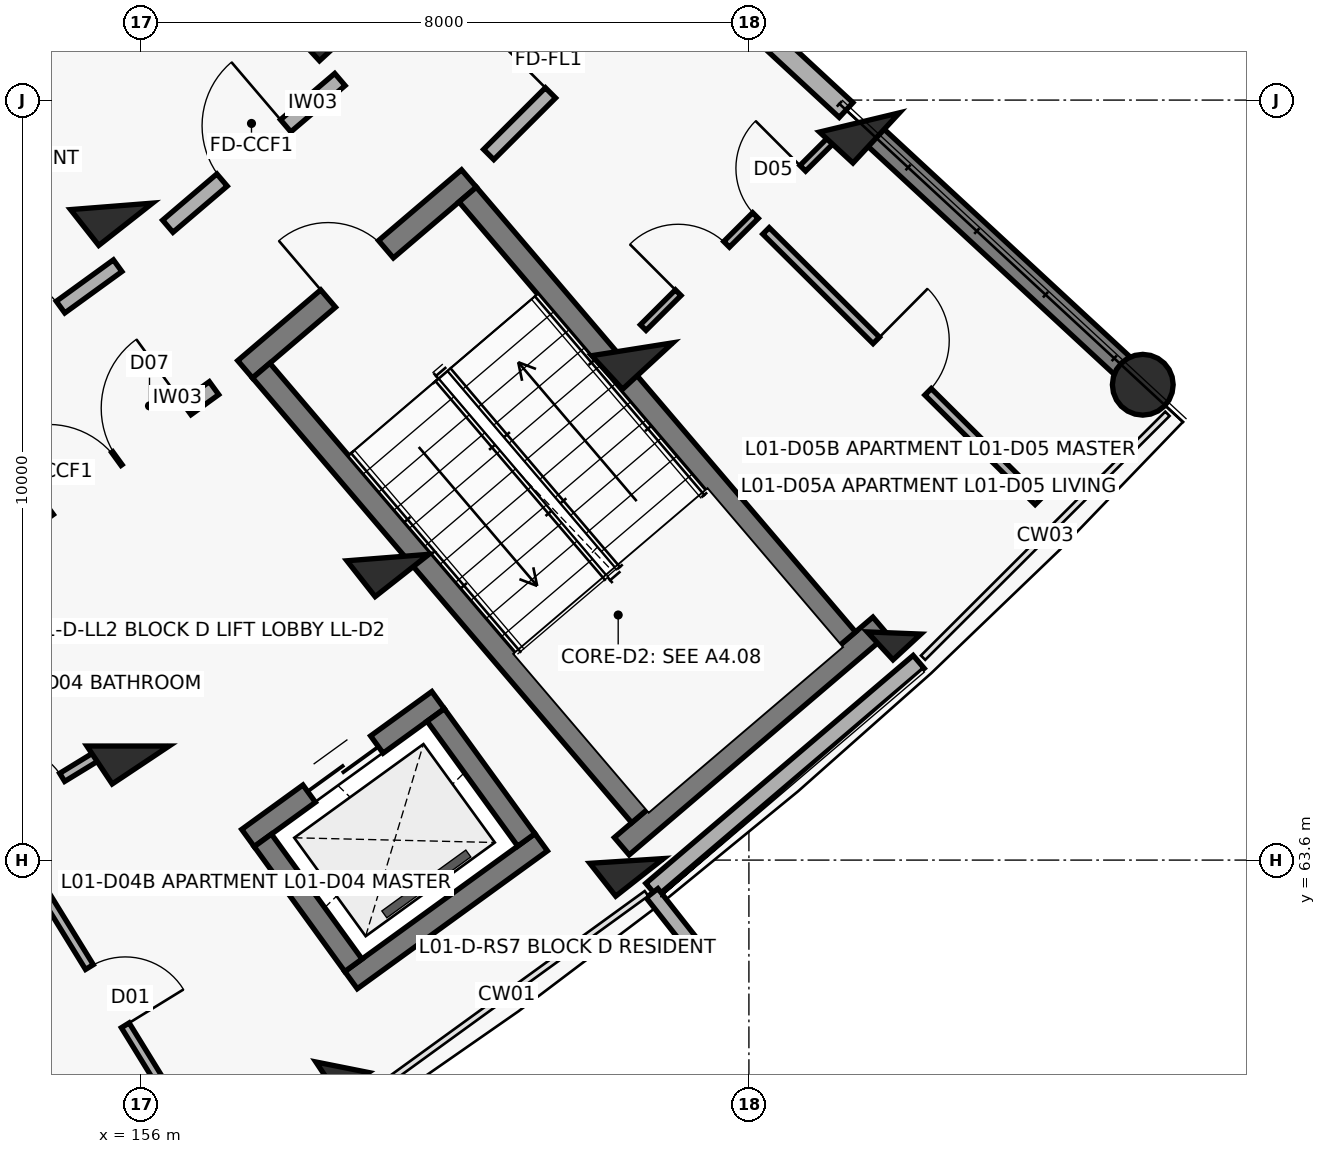
"""IFC4 building model, lengths in metres.
Left out: names, types, materials, properties, quantities, classifications, styles, units other than length and angle.
Written with IfcOpenShell. Run it as: python <this file> out.ifc"""

import sys

from ifc_helpers import new_model, si_unit, direction, frame, frame_2d, origin, origin_2d, place, context, subcontext, project, spatial, rectangle, circle, extrude, element, fill, save


model = new_model("IFC4")
c1 = context("Model", 3, precision=1e-05, world=origin(), true_north=direction((0.0, 1.0)))
c2 = subcontext(c1, "Body", "Model", "MODEL_VIEW")
j1 = project(units=[si_unit("LENGTHUNIT", "METRE"), si_unit("PLANEANGLEUNIT", "RADIAN")], contexts=[c1])
p1 = place(None, origin())
s1 = spatial("IfcSite", under=j1, at=p1, CompositionType="ELEMENT")
p2 = place(p1, origin())
s2 = spatial("IfcBuilding", under=s1, at=p2, CompositionType="ELEMENT")
p3 = place(p2, frame((0.0, 0.0, 4.5)))
s3 = spatial("IfcBuildingStorey", under=s2, at=p3, CompositionType="ELEMENT", Elevation=4.5)
p4 = place(p3, frame((155.831, 65.101, 0.0), z_axis=(0.0, 0.0, 1.0), x_axis=(0.554844427448, -0.83195412213, 0.0)))
e1 = element("IfcColumn", 1, at=p4, inside=s3, PredefinedType="COLUMN", context=c2, shape_type="SweptSolid", body=[
    extrude(rectangle(XDim=0.6, YDim=0.9, at=origin_2d()), origin(), (0.0, 0.0, 1.0), 3.6),
])
p5 = place(p3, frame((158.649, 60.875, 0.0), z_axis=(0.0, 0.0, 1.0), x_axis=(0.554844427448, -0.83195412213, 0.0)))
e2 = element("IfcColumn", 2, at=p5, inside=s3, PredefinedType="COLUMN", context=c2, shape_type="SweptSolid", body=[
    extrude(rectangle(XDim=0.5, YDim=0.5, at=origin_2d()), origin(), (0.0, 0.0, 1.0), 3.6),
])
for number, where, z_axis, x_axis in (
    (3, (155.614, 72.202, 0.0), (0.0, 0.0, 1.0), (0.618, -0.786, 0.0)),
    (4, (159.25, 67.581, 0.0), (0.0, 0.0, 1.0), (0.618, -0.786, 0.0)),
):
    element("IfcColumn", number, at=place(p3, frame(where, z_axis=z_axis, x_axis=x_axis)), inside=s3, PredefinedType="COLUMN", context=c2, shape_type="SweptSolid", body=[
        extrude(rectangle(XDim=0.6, YDim=0.9, at=origin_2d()), origin(), (0.0, 0.0, 1.0), 3.6),
    ])
p6 = place(p3, frame((162.392, 63.589, 0.0), z_axis=(0.0, 0.0, 1.0), x_axis=(0.618408395358, -0.785856893175, 0.0)))
e5 = element("IfcColumn", 5, at=p6, inside=s3, PredefinedType="COLUMN", context=c2, shape_type="SweptSolid", body=[
    extrude(rectangle(XDim=0.55, YDim=0.8, at=origin_2d()), origin(), (0.0, 0.0, 1.0), 3.6),
])
for number, where, z_axis, x_axis in (
    (6, (158.477, 74.643, 0.0), (0.0, 0.0, 1.0), (0.678, -0.735, 0.0)),
    (7, (162.465, 70.322, 0.0), (0.0, 0.0, 1.0), (0.678, -0.735, 0.0)),
):
    element("IfcColumn", number, at=place(p3, frame(where, z_axis=z_axis, x_axis=x_axis)), inside=s3, PredefinedType="COLUMN", context=c2, shape_type="SweptSolid", body=[
        extrude(rectangle(XDim=0.6, YDim=0.9, at=origin_2d()), origin(), (0.0, 0.0, 1.0), 3.6),
    ])
p7 = place(p3, frame((165.91, 66.588, 0.0), z_axis=(0.0, 0.0, 1.0), x_axis=(0.678159669868, -0.73491459515, 0.0)))
e8 = element("IfcColumn", 8, at=p7, inside=s3, PredefinedType="COLUMN", context=c2, shape_type="SweptSolid", body=[
    extrude(rectangle(XDim=0.5, YDim=0.5, at=origin_2d()), origin(), (0.0, 0.0, 1.0), 3.6),
])
p8 = place(p3, frame((165.455, 73.306, 0.0), z_axis=(0.0, 0.0, 1.0), x_axis=(0.733729864503, -0.679441304262, 0.0)))
e9 = element("IfcColumn", 9, at=p8, inside=s3, PredefinedType="COLUMN", context=c2, shape_type="SweptSolid", body=[
    extrude(rectangle(XDim=0.6, YDim=0.9, at=origin_2d()), origin(), (0.0, 0.0, 1.0), 3.6),
])
p9 = place(p3, frame((169.182, 69.854, 0.0), z_axis=(0.0, 0.0, 1.0), x_axis=(0.733729864503, -0.679441304262, 0.0)))
e10 = element("IfcColumn", 10, at=p9, inside=s3, PredefinedType="COLUMN", context=c2, shape_type="SweptSolid", body=[
    extrude(circle(Radius=0.4, at=origin_2d()), origin(), (0.0, 0.0, 1.0), 3.6),
])
p10 = place(p3, frame((165.587, 73.184, 0.0), z_axis=(0.0, 0.0, 1.0), x_axis=(0.733739663667, -0.679430721974, 0.0)))
e11 = element("IfcWall", 11, at=p10, inside=s3, PredefinedType="SHEAR", context=c2, shape_type="SweptSolid", body=[
    extrude(rectangle(XDim=4.72, YDim=0.31, at=frame_2d((2.36, 0.0))), origin(), (0.0, 0.0, 1.0), 3.36),
])
p11 = place(p3, frame((162.716, 63.209, 0.0), z_axis=(0.0, 0.0, 1.0), x_axis=(0.760968923704, 0.64878833001, 0.0)))
e12 = element("IfcWall", 12, at=p11, inside=s3, PredefinedType="SOLIDWALL", context=c2, shape_type="SweptSolid", body=[
    extrude(rectangle(XDim=4.623, YDim=0.224, at=frame_2d((2.311, 0.0))), origin(), (0.0, 0.0, 1.0), 2.6),
])
p12 = place(p3, frame((162.726, 63.164, 0.0), z_axis=(0.0, 0.0, 1.0), x_axis=(0.618456270212, -0.785819217019, 0.0)))
e13 = element("IfcWall", 13, at=p12, inside=s3, PredefinedType="PARAPET", context=c2, shape_type="SweptSolid", body=[
    extrude(rectangle(XDim=0.9, YDim=0.195, at=frame_2d((0.45, 0.0))), origin(), (0.0, 0.0, 1.0), 2.6),
])
p13 = place(p3, frame((159.262, 79.041, 0.0), z_axis=(0.0, 0.0, 1.0), x_axis=(0.733738684326, -0.679431779595, 0.0)))
e14 = element("IfcWall", 14, at=p13, inside=s3, PredefinedType="SOLIDWALL", context=c2, shape_type="SweptSolid", body=[
    extrude(rectangle(XDim=8.2, YDim=0.265, at=frame_2d((4.1, 0.0))), origin(), (0.0, 0.0, 1.0), 2.58),
])
p14 = place(p13, frame((3.59, 0.0, 0.75)))
e15 = element("IfcOpeningElement", 15, at=p14, cuts=e14, PredefinedType="OPENING", context=c2, shape_type="SweptSolid", body=[
    extrude(rectangle(XDim=1.35, YDim=1.35, at=frame_2d((0.675, 0.675))), frame((0.0, 0.142, 0.0), z_axis=(0.0, -1.0, 0.0), x_axis=(1.0, 0.0, 0.0)), (0.0, 0.0, 1.0), 0.285),
])
p15 = place(p3, frame((157.372, 70.058, 0.0), z_axis=(0.0, 0.0, 1.0), x_axis=(0.760990583254, 0.648762924495, 0.0)))
e16 = element("IfcWall", 16, at=p15, inside=s3, PredefinedType="SHEAR", context=c2, shape_type="SweptSolid", body=[
    extrude(rectangle(XDim=3.87, YDim=0.3, at=frame_2d((1.935, 0.0))), origin(), (0.0, 0.0, 1.0), 3.6),
])
p16 = place(p15, frame((1.435, 0.0, 0.0)))
e17 = element("IfcOpeningElement", 17, at=p16, cuts=e16, PredefinedType="OPENING", context=c2, shape_type="SweptSolid", body=[
    extrude(rectangle(XDim=1.0, YDim=2.15, at=frame_2d((0.5, 1.075))), frame((0.0, 0.16, 0.0), z_axis=(0.0, -1.0, 0.0), x_axis=(1.0, 0.0, 0.0)), (0.0, 0.0, 1.0), 0.32),
])
p17 = place(p3, frame((162.327, 63.783, 0.0), z_axis=(0.0, 0.0, 1.0), x_axis=(0.760969560012, 0.648787583678, 0.0)))
e18 = element("IfcWall", 18, at=p17, inside=s3, PredefinedType="SHEAR", context=c2, shape_type="SweptSolid", body=[
    extrude(rectangle(XDim=4.47, YDim=0.3, at=frame_2d((2.235, 0.0))), origin(), (0.0, 0.0, 1.0), 3.6),
])
p18 = place(p3, frame((157.583, 70.041, 0.0), z_axis=(0.0, 0.0, 1.0), x_axis=(0.648762810187, -0.760990680704, 0.0)))
e19 = element("IfcWall", 19, at=p18, inside=s3, PredefinedType="SHEAR", context=c2, shape_type="SweptSolid", body=[
    extrude(rectangle(XDim=7.69, YDim=0.3, at=frame_2d((3.845, 0.0))), origin(), (0.0, 0.0, 1.0), 3.6),
])
p19 = place(p3, frame((160.3, 72.357, 0.0), z_axis=(0.0, 0.0, 1.0), x_axis=(0.648781194888, -0.760975006922, 0.0)))
e20 = element("IfcWall", 20, at=p19, inside=s3, PredefinedType="SHEAR", context=c2, shape_type="SweptSolid", body=[
    extrude(rectangle(XDim=7.69, YDim=0.3, at=frame_2d((3.845, 0.0))), origin(), (0.0, 0.0, 1.0), 3.6),
])
p20 = place(p3, frame((157.409, 63.89, 0.0), z_axis=(0.0, 0.0, 1.0), x_axis=(0.809510936031, 0.587104798521, 0.0)))
e21 = element("IfcWall", 21, at=p20, inside=s3, PredefinedType="SHEAR", context=c2, shape_type="SweptSolid", body=[
    extrude(rectangle(XDim=3.09, YDim=0.28, at=frame_2d((1.545, 0.0))), origin(), (0.0, 0.0, 1.0), 3.6),
])
p21 = place(p20, frame((0.995, 0.0, 0.0)))
e22 = element("IfcOpeningElement", 22, at=p21, cuts=e21, PredefinedType="OPENING", context=c2, shape_type="SweptSolid", body=[
    extrude(rectangle(XDim=1.1, YDim=2.15, at=frame_2d((0.55, 1.075))), frame((0.0, 0.15, 0.0), z_axis=(0.0, -1.0, 0.0), x_axis=(1.0, 0.0, 0.0)), (0.0, 0.0, 1.0), 0.3),
])
p22 = place(p3, frame((158.765, 62.021, 0.0), z_axis=(0.0, 0.0, 1.0), x_axis=(0.809548485838, 0.587053020669, 0.0)))
e23 = element("IfcWall", 23, at=p22, inside=s3, PredefinedType="SHEAR", context=c2, shape_type="SweptSolid", body=[
    extrude(rectangle(XDim=3.09, YDim=0.28, at=frame_2d((1.545, 0.0))), origin(), (0.0, 0.0, 1.0), 3.6),
])
p23 = place(p3, frame((157.604, 63.859, 0.0), z_axis=(0.0, 0.0, 1.0), x_axis=(0.587127188998, -0.809494696671, 0.0)))
e24 = element("IfcWall", 24, at=p23, inside=s3, PredefinedType="SHEAR", context=c2, shape_type="SweptSolid", body=[
    extrude(rectangle(XDim=2.03, YDim=0.28, at=frame_2d((1.015, 0.0))), origin(), (0.0, 0.0, 1.0), 3.6),
])
p24 = place(p3, frame((159.879, 65.509, 0.0), z_axis=(0.0, 0.0, 1.0), x_axis=(0.58704837408, -0.809551855344, 0.0)))
e25 = element("IfcWall", 25, at=p24, inside=s3, PredefinedType="SHEAR", context=c2, shape_type="SweptSolid", body=[
    extrude(rectangle(XDim=2.03, YDim=0.28, at=frame_2d((1.015, 0.0))), origin(), (0.0, 0.0, 1.0), 3.6),
])
p25 = place(p3, frame((152.434, 63.141, 0.0), z_axis=(0.0, 0.0, 1.0), x_axis=(0.853089873067, 0.521763996909, 0.0)))
e26 = element("IfcWall", 26, at=p25, inside=s3, PredefinedType="PARTITIONING", context=c2, shape_type="SweptSolid", body=[
    extrude(rectangle(XDim=3.616, YDim=0.125, at=frame_2d((1.808, 0.0))), origin(), (0.0, 0.0, 1.0), 2.58),
])
p26 = place(p25, frame((0.65, 0.0, 0.0)))
e27 = element("IfcOpeningElement", 27, at=p26, cuts=e26, PredefinedType="OPENING", context=c2, shape_type="SweptSolid", body=[
    extrude(rectangle(XDim=0.9, YDim=2.1, at=frame_2d((0.45, 1.05))), frame((0.0, 0.073, 0.0), z_axis=(0.0, -1.0, 0.0), x_axis=(1.0, 0.0, 0.0)), (0.0, 0.0, 1.0), 0.145),
])
p27 = place(p25, frame((2.086, 0.0, 0.0)))
e28 = element("IfcOpeningElement", 28, at=p27, cuts=e26, PredefinedType="OPENING", context=c2, shape_type="SweptSolid", body=[
    extrude(rectangle(XDim=0.88, YDim=2.1, at=frame_2d((0.44, 1.05))), frame((0.0, 0.073, 0.0), z_axis=(0.0, -1.0, 0.0), x_axis=(1.0, 0.0, 0.0)), (0.0, 0.0, 1.0), 0.145),
])
p28 = place(p3, frame((154.235, 63.96, 0.0), z_axis=(0.0, 0.0, 1.0), x_axis=(0.524202618281, -0.851593573829, 0.0)))
e29 = element("IfcWall", 29, at=p28, inside=s3, PredefinedType="PARTITIONING", context=c2, shape_type="SweptSolid", body=[
    extrude(rectangle(XDim=5.05, YDim=0.12, at=frame_2d((2.525, 0.0))), origin(), (0.0, 0.0, 1.0), 2.58),
])
p29 = place(p28, frame((2.075, 0.0, 0.0)))
e30 = element("IfcOpeningElement", 30, at=p29, cuts=e29, PredefinedType="OPENING", context=c2, shape_type="SweptSolid", body=[
    extrude(rectangle(XDim=0.9, YDim=2.1, at=frame_2d((0.45, 1.05))), frame((0.0, 0.07, 0.0), z_axis=(0.0, -1.0, 0.0), x_axis=(1.0, 0.0, 0.0)), (0.0, 0.0, 1.0), 0.14),
])
p30 = place(p3, frame((154.423, 67.968, 0.0), z_axis=(0.0, 0.0, 1.0), x_axis=(0.809516127005, 0.587097641043, 0.0)))
e31 = element("IfcWall", 31, at=p30, inside=s3, PredefinedType="SOLIDWALL", context=c2, shape_type="SweptSolid", body=[
    extrude(rectangle(XDim=3.137, YDim=0.21, at=frame_2d((1.569, 0.0))), origin(), (0.0, 0.0, 1.0), 2.58),
])
p31 = place(p30, frame((0.45, 0.0, 0.0)))
e32 = element("IfcOpeningElement", 32, at=p31, cuts=e31, PredefinedType="OPENING", context=c2, shape_type="SweptSolid", body=[
    extrude(rectangle(XDim=1.1, YDim=2.15, at=frame_2d((0.55, 1.075))), frame((0.0, 0.115, 0.0), z_axis=(0.0, -1.0, 0.0), x_axis=(1.0, 0.0, 0.0)), (0.0, 0.0, 1.0), 0.23),
])
p32 = place(p30, frame((1.567, 0.0, 0.0)))
e33 = element("IfcOpeningElement", 33, at=p32, cuts=e31, PredefinedType="OPENING", context=c2, shape_type="SweptSolid", body=[
    extrude(rectangle(XDim=1.12, YDim=2.15, at=frame_2d((0.56, 1.075))), frame((0.0, 0.115, 0.0), z_axis=(0.0, -1.0, 0.0), x_axis=(1.0, 0.0, 0.0)), (0.0, 0.0, 1.0), 0.23),
])
p33 = place(p3, frame((153.285, 69.674, 0.0), z_axis=(0.0, 0.0, 1.0), x_axis=(0.809505174959, 0.587112741911, 0.0)))
e34 = element("IfcWall", 34, at=p33, inside=s3, PredefinedType="SOLIDWALL", context=c2, shape_type="SweptSolid", body=[
    extrude(rectangle(XDim=2.976, YDim=0.19, at=frame_2d((1.488, 0.0))), origin(), (0.0, 0.0, 1.0), 2.58),
])
p34 = place(p33, frame((0.928, 0.0, 0.0)))
e35 = element("IfcOpeningElement", 35, at=p34, cuts=e34, PredefinedType="OPENING", context=c2, shape_type="SweptSolid", body=[
    extrude(rectangle(XDim=1.12, YDim=2.15, at=frame_2d((0.56, 1.075))), frame((0.0, 0.105, 0.0), z_axis=(0.0, -1.0, 0.0), x_axis=(1.0, 0.0, 0.0)), (0.0, 0.0, 1.0), 0.21),
])
p35 = place(p3, frame((156.354, 71.94, 0.0), z_axis=(0.0, 0.0, 1.0), x_axis=(0.760991187621, 0.648762215579, 0.0)))
e36 = element("IfcWall", 36, at=p35, inside=s3, PredefinedType="SOLIDWALL", context=c2, shape_type="SweptSolid", body=[
    extrude(rectangle(XDim=2.976, YDim=0.21, at=frame_2d((1.488, 0.0))), origin(), (0.0, 0.0, 1.0), 2.58),
])
p36 = place(p35, frame((0.938, 0.0, 0.0)))
e37 = element("IfcOpeningElement", 37, at=p36, cuts=e36, PredefinedType="OPENING", context=c2, shape_type="SweptSolid", body=[
    extrude(rectangle(XDim=1.1, YDim=2.15, at=frame_2d((0.55, 1.075))), frame((0.0, 0.115, 0.0), z_axis=(0.0, -1.0, 0.0), x_axis=(1.0, 0.0, 0.0)), (0.0, 0.0, 1.0), 0.23),
])
p37 = place(p3, frame((160.576, 72.884, 0.0), z_axis=(0.0, 0.0, 1.0), x_axis=(0.70773973846, 0.706473256822, 0.0)))
e38 = element("IfcWall", 38, at=p37, inside=s3, PredefinedType="SOLIDWALL", context=c2, shape_type="SweptSolid", body=[
    extrude(rectangle(XDim=3.277, YDim=0.19, at=frame_2d((1.639, 0.0))), origin(), (0.0, 0.0, 1.0), 2.58),
])
p38 = place(p37, frame((1.148, 0.0, 0.0)))
e39 = element("IfcOpeningElement", 39, at=p38, cuts=e38, PredefinedType="OPENING", context=c2, shape_type="SweptSolid", body=[
    extrude(rectangle(XDim=0.98, YDim=2.15, at=frame_2d((0.49, 1.075))), frame((0.0, 0.105, 0.0), z_axis=(0.0, -1.0, 0.0), x_axis=(1.0, 0.0, 0.0)), (0.0, 0.0, 1.0), 0.21),
])
p39 = place(p3, frame((162.609, 70.607, 0.0), z_axis=(0.0, 0.0, 1.0), x_axis=(0.707714058013, 0.70649898237, 0.0)))
e40 = element("IfcWall", 40, at=p39, inside=s3, PredefinedType="PARTITIONING", context=c2, shape_type="SweptSolid", body=[
    extrude(rectangle(XDim=3.617, YDim=0.105, at=frame_2d((1.808, 0.0))), origin(), (0.0, 0.0, 1.0), 2.58),
])
p40 = place(p39, frame((0.65, 0.0, 0.0)))
e41 = element("IfcOpeningElement", 41, at=p40, cuts=e40, PredefinedType="OPENING", context=c2, shape_type="SweptSolid", body=[
    extrude(rectangle(XDim=0.9, YDim=2.1, at=frame_2d((0.45, 1.05))), frame((0.0, 0.062, 0.0), z_axis=(0.0, -1.0, 0.0), x_axis=(1.0, 0.0, 0.0)), (0.0, 0.0, 1.0), 0.125),
])
p41 = place(p39, frame((2.086, 0.0, 0.0)))
e42 = element("IfcOpeningElement", 42, at=p41, cuts=e40, PredefinedType="OPENING", context=c2, shape_type="SweptSolid", body=[
    extrude(rectangle(XDim=0.88, YDim=2.1, at=frame_2d((0.44, 1.05))), frame((0.0, 0.062, 0.0), z_axis=(0.0, -1.0, 0.0), x_axis=(1.0, 0.0, 0.0)), (0.0, 0.0, 1.0), 0.125),
])
p42 = place(p3, frame((164.225, 71.879, 0.0), z_axis=(0.0, 0.0, 1.0), x_axis=(0.709543935341, -0.704661197897, 0.0)))
e43 = element("IfcWall", 43, at=p42, inside=s3, PredefinedType="PARTITIONING", context=c2, shape_type="SweptSolid", body=[
    extrude(rectangle(XDim=5.05, YDim=0.12, at=frame_2d((2.525, 0.0))), origin(), (0.0, 0.0, 1.0), 2.58),
])
p43 = place(p42, frame((2.045, 0.0, 0.0)))
e44 = element("IfcOpeningElement", 44, at=p43, cuts=e43, PredefinedType="OPENING", context=c2, shape_type="SweptSolid", body=[
    extrude(rectangle(XDim=0.96, YDim=2.1, at=frame_2d((0.48, 1.05))), frame((0.0, 0.07, 0.0), z_axis=(0.0, -1.0, 0.0), x_axis=(1.0, 0.0, 0.0)), (0.0, 0.0, 1.0), 0.14),
])
p44 = place(p16, origin())
e45 = element("IfcDoor", 45, at=p44, inside=s3, OperationType="SINGLE_SWING_LEFT", PredefinedType="DOOR", context=c2, shape_type="SweptSolid", body=[
    extrude(rectangle(XDim=1.0, YDim=2.15, at=frame_2d((0.5, 1.075))), frame((0.0, 0.025, 0.0), z_axis=(0.0, -1.0, 0.0), x_axis=(1.0, 0.0, 0.0)), (0.0, 0.0, 1.0), 0.05),
])
fill(e17, e45)
p45 = place(p21, origin())
e46 = element("IfcDoor", 46, at=p45, inside=s3, OperationType="DOUBLE_DOOR_SLIDING", PredefinedType="DOOR", context=c2, shape_type="SweptSolid", body=[
    extrude(rectangle(XDim=1.1, YDim=2.15, at=frame_2d((0.55, 1.075))), frame((0.0, 0.025, 0.0), z_axis=(0.0, -1.0, 0.0), x_axis=(1.0, 0.0, 0.0)), (0.0, 0.0, 1.0), 0.05),
])
fill(e22, e46)
p46 = place(p27, origin())
e47 = element("IfcDoor", 47, at=p46, inside=s3, OperationType="SINGLE_SWING_LEFT", PredefinedType="DOOR", context=c2, shape_type="SweptSolid", body=[
    extrude(rectangle(XDim=0.88, YDim=2.1, at=frame_2d((0.44, 1.05))), frame((0.0, 0.025, 0.0), z_axis=(0.0, -1.0, 0.0), x_axis=(1.0, 0.0, 0.0)), (0.0, 0.0, 1.0), 0.05),
])
fill(e28, e47)
p47 = place(p29, origin())
e48 = element("IfcDoor", 48, at=p47, inside=s3, OperationType="SINGLE_SWING_RIGHT", PredefinedType="DOOR", context=c2, shape_type="SweptSolid", body=[
    extrude(rectangle(XDim=0.9, YDim=2.1, at=frame_2d((0.45, 1.05))), frame((0.0, 0.025, 0.0), z_axis=(0.0, -1.0, 0.0), x_axis=(1.0, 0.0, 0.0)), (0.0, 0.0, 1.0), 0.05),
])
fill(e30, e48)
p48 = place(p31, origin())
e49 = element("IfcDoor", 49, at=p48, inside=s3, OperationType="SINGLE_SWING_LEFT", PredefinedType="DOOR", context=c2, shape_type="SweptSolid", body=[
    extrude(rectangle(XDim=1.1, YDim=2.15, at=frame_2d((0.55, 1.075))), frame((0.0, 0.025, 0.0), z_axis=(0.0, -1.0, 0.0), x_axis=(1.0, 0.0, 0.0)), (0.0, 0.0, 1.0), 0.05),
])
fill(e32, e49)
p49 = place(p32, origin())
e50 = element("IfcDoor", 50, at=p49, inside=s3, OperationType="SINGLE_SWING_RIGHT", PredefinedType="DOOR", context=c2, shape_type="SweptSolid", body=[
    extrude(rectangle(XDim=1.12, YDim=2.15, at=frame_2d((0.56, 1.075))), frame((0.0, 0.025, 0.0), z_axis=(0.0, -1.0, 0.0), x_axis=(1.0, 0.0, 0.0)), (0.0, 0.0, 1.0), 0.05),
])
fill(e33, e50)
p50 = place(p34, origin())
e51 = element("IfcDoor", 51, at=p50, inside=s3, OperationType="SINGLE_SWING_LEFT", PredefinedType="DOOR", context=c2, shape_type="SweptSolid", body=[
    extrude(rectangle(XDim=1.12, YDim=2.15, at=frame_2d((0.56, 1.075))), frame((0.0, 0.025, 0.0), z_axis=(0.0, -1.0, 0.0), x_axis=(1.0, 0.0, 0.0)), (0.0, 0.0, 1.0), 0.05),
])
fill(e35, e51)
p51 = place(p36, origin())
e52 = element("IfcDoor", 52, at=p51, inside=s3, OperationType="SINGLE_SWING_RIGHT", PredefinedType="DOOR", context=c2, shape_type="SweptSolid", body=[
    extrude(rectangle(XDim=1.1, YDim=2.15, at=frame_2d((0.55, 1.075))), frame((0.0, 0.025, 0.0), z_axis=(0.0, -1.0, 0.0), x_axis=(1.0, 0.0, 0.0)), (0.0, 0.0, 1.0), 0.05),
])
fill(e37, e52)
p52 = place(p38, origin())
e53 = element("IfcDoor", 53, at=p52, inside=s3, OperationType="SINGLE_SWING_LEFT", PredefinedType="DOOR", context=c2, shape_type="SweptSolid", body=[
    extrude(rectangle(XDim=0.98, YDim=2.15, at=frame_2d((0.49, 1.075))), frame((0.0, 0.025, 0.0), z_axis=(0.0, -1.0, 0.0), x_axis=(1.0, 0.0, 0.0)), (0.0, 0.0, 1.0), 0.05),
])
fill(e39, e53)
p53 = place(p40, origin())
e54 = element("IfcDoor", 54, at=p53, inside=s3, OperationType="SINGLE_SWING_LEFT", PredefinedType="DOOR", context=c2, shape_type="SweptSolid", body=[
    extrude(rectangle(XDim=0.9, YDim=2.1, at=frame_2d((0.45, 1.05))), frame((0.0, 0.025, 0.0), z_axis=(0.0, -1.0, 0.0), x_axis=(1.0, 0.0, 0.0)), (0.0, 0.0, 1.0), 0.05),
])
fill(e41, e54)
p54 = place(p41, origin())
e55 = element("IfcDoor", 55, at=p54, inside=s3, OperationType="SINGLE_SWING_RIGHT", PredefinedType="DOOR", context=c2, shape_type="SweptSolid", body=[
    extrude(rectangle(XDim=0.88, YDim=2.1, at=frame_2d((0.44, 1.05))), frame((0.0, 0.025, 0.0), z_axis=(0.0, -1.0, 0.0), x_axis=(1.0, 0.0, 0.0)), (0.0, 0.0, 1.0), 0.05),
])
fill(e42, e55)
p55 = place(p43, origin())
e56 = element("IfcDoor", 56, at=p55, inside=s3, OperationType="SINGLE_SWING_LEFT", PredefinedType="DOOR", context=c2, shape_type="SweptSolid", body=[
    extrude(rectangle(XDim=0.96, YDim=2.1, at=frame_2d((0.48, 1.05))), frame((0.0, 0.025, 0.0), z_axis=(0.0, -1.0, 0.0), x_axis=(1.0, 0.0, 0.0)), (0.0, 0.0, 1.0), 0.05),
])
fill(e44, e56)
save(model, sys.argv[1])
